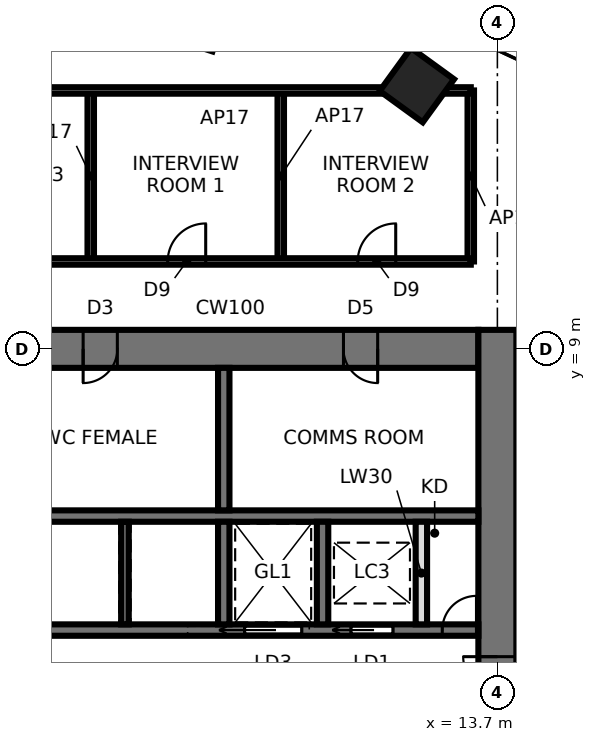
"""IFC4 building model, lengths in metres.
Left out: names, types, materials, properties, quantities, classifications, styles, units other than length and angle.
Written with IfcOpenShell. Run it as: python <this file> out.ifc"""

import sys

from ifc_helpers import new_model, si_unit, direction, frame, frame_2d, origin, origin_2d, place, context, subcontext, project, spatial, rectangle, extrude, element, fill, save


model = new_model("IFC4")
c1 = context("Model", 3, precision=1e-05, world=origin(), true_north=direction((0.0, 1.0)))
c2 = subcontext(c1, "Body", "Model", "MODEL_VIEW")
j1 = project(units=[si_unit("LENGTHUNIT", "METRE"), si_unit("PLANEANGLEUNIT", "RADIAN")], contexts=[c1])
p1 = place(None, origin())
s1 = spatial("IfcSite", under=j1, at=p1, CompositionType="ELEMENT")
p2 = place(p1, origin())
s2 = spatial("IfcBuilding", under=s1, at=p2, CompositionType="ELEMENT")
p3 = place(p2, frame((0.0, 0.0, 234.5)))
s3 = spatial("IfcBuildingStorey", under=s2, at=p3, CompositionType="ELEMENT", Elevation=234.5)
p4 = place(p3, frame((11.581, 15.94, 0.0), z_axis=(0.0, 0.0, 1.0), x_axis=(0.587785252292, 0.809016994375, 0.0)))
e1 = element("IfcColumn", 1, at=p4, inside=s3, PredefinedType="COLUMN", context=c2, shape_type="SweptSolid", body=[
    extrude(rectangle(XDim=1.4, YDim=1.4, at=origin_2d()), origin(), (0.0, 0.0, 1.0), 3.9),
])
p5 = place(p3, frame((13.2, 9.0, 0.0), z_axis=(0.0, 0.0, 1.0), x_axis=(-1.0, 0.0, 0.0)))
e2 = element("IfcWall", 2, at=p5, inside=s3, PredefinedType="SHEAR", context=c2, shape_type="SweptSolid", body=[
    extrude(rectangle(XDim=26.4, YDim=1.0, at=frame_2d((13.2, 0.0))), origin(), (0.0, 0.0, 1.0), 3.9),
])
p6 = place(p5, frame((2.65, 0.0, 0.0)))
e3 = element("IfcOpeningElement", 3, at=p6, cuts=e2, PredefinedType="OPENING", context=c2, shape_type="SweptSolid", body=[
    extrude(rectangle(XDim=0.9, YDim=2.1, at=frame_2d((0.45, 1.05))), frame((0.0, 0.51, 0.0), z_axis=(0.0, -1.0, 0.0), x_axis=(1.0, 0.0, 0.0)), (0.0, 0.0, 1.0), 1.02),
])
p7 = place(p5, frame((9.5, 0.0, 0.0)))
e4 = element("IfcOpeningElement", 4, at=p7, cuts=e2, PredefinedType="OPENING", context=c2, shape_type="SweptSolid", body=[
    extrude(rectangle(XDim=0.9, YDim=2.1, at=frame_2d((0.45, 1.05))), frame((0.0, 0.51, 0.0), z_axis=(0.0, -1.0, 0.0), x_axis=(1.0, 0.0, 0.0)), (0.0, 0.0, 1.0), 1.02),
])
p8 = place(p5, frame((16.0, 0.0, 0.0)))
e5 = element("IfcOpeningElement", 5, at=p8, cuts=e2, PredefinedType="OPENING", context=c2, shape_type="SweptSolid", body=[
    extrude(rectangle(XDim=0.9, YDim=2.1, at=frame_2d((0.45, 1.05))), frame((0.0, 0.51, 0.0), z_axis=(0.0, -1.0, 0.0), x_axis=(1.0, 0.0, 0.0)), (0.0, 0.0, 1.0), 1.02),
])
p9 = place(p5, frame((21.25, 0.0, 0.0)))
e6 = element("IfcOpeningElement", 6, at=p9, cuts=e2, PredefinedType="OPENING", context=c2, shape_type="SweptSolid", body=[
    extrude(rectangle(XDim=0.9, YDim=2.1, at=frame_2d((0.45, 1.05))), frame((0.0, 0.51, 0.0), z_axis=(0.0, -1.0, 0.0), x_axis=(1.0, 0.0, 0.0)), (0.0, 0.0, 1.0), 1.02),
])
p10 = place(p5, frame((24.8, 0.0, 0.0)))
e7 = element("IfcOpeningElement", 7, at=p10, cuts=e2, PredefinedType="OPENING", context=c2, shape_type="SweptSolid", body=[
    extrude(rectangle(XDim=1.0, YDim=2.1, at=frame_2d((0.5, 1.05))), frame((0.0, 0.51, 0.0), z_axis=(0.0, -1.0, 0.0), x_axis=(1.0, 0.0, 0.0)), (0.0, 0.0, 1.0), 1.02),
])
p11 = place(p3, frame((13.7, -9.5, 0.0), z_axis=(0.0, 0.0, 1.0), x_axis=(0.0, 1.0, 0.0)))
e8 = element("IfcWall", 8, at=p11, inside=s3, PredefinedType="SHEAR", context=c2, shape_type="SweptSolid", body=[
    extrude(rectangle(XDim=19.0, YDim=1.0, at=frame_2d((9.5, 0.0))), origin(), (0.0, 0.0, 1.0), 3.9),
])
p12 = place(p11, frame((8.6, 0.0, 0.0)))
e9 = element("IfcOpeningElement", 9, at=p12, cuts=e8, PredefinedType="OPENING", context=c2, shape_type="SweptSolid", body=[
    extrude(rectangle(XDim=1.8, YDim=2.4, at=frame_2d((0.9, 1.2))), frame((0.0, 0.51, 0.0), z_axis=(0.0, -1.0, 0.0), x_axis=(1.0, 0.0, 0.0)), (0.0, 0.0, 1.0), 1.02),
])
p13 = place(p3, frame((-13.2, 1.6, 0.0), z_axis=(0.0, 0.0, 1.0), x_axis=(1.0, 0.0, 0.0)))
e10 = element("IfcWall", 10, at=p13, inside=s3, PredefinedType="SHEAR", context=c2, shape_type="SweptSolid", body=[
    extrude(rectangle(XDim=26.4, YDim=0.3, at=frame_2d((13.2, 0.0))), origin(), (0.0, 0.0, 1.0), 3.9),
])
p14 = place(p13, frame((0.25, 0.0, 0.0)))
e11 = element("IfcOpeningElement", 11, at=p14, cuts=e10, PredefinedType="OPENING", context=c2, shape_type="SweptSolid", body=[
    extrude(rectangle(XDim=1.0, YDim=2.1, at=frame_2d((0.5, 1.05))), frame((0.0, 0.16, 0.0), z_axis=(0.0, -1.0, 0.0), x_axis=(1.0, 0.0, 0.0)), (0.0, 0.0, 1.0), 0.32),
])
p15 = place(p13, frame((23.05, 0.0, 0.0)))
e12 = element("IfcOpeningElement", 12, at=p15, cuts=e10, PredefinedType="OPENING", context=c2, shape_type="SweptSolid", body=[
    extrude(rectangle(XDim=1.1, YDim=2.3, at=frame_2d((0.55, 1.15))), frame((0.0, 0.16, 0.0), z_axis=(0.0, -1.0, 0.0), x_axis=(1.0, 0.0, 0.0)), (0.0, 0.0, 1.0), 0.32),
])
p16 = place(p13, frame((20.25, 0.0, 0.0)))
e13 = element("IfcOpeningElement", 13, at=p16, cuts=e10, PredefinedType="OPENING", context=c2, shape_type="SweptSolid", body=[
    extrude(rectangle(XDim=1.5, YDim=2.4, at=frame_2d((0.75, 1.2))), frame((0.0, 0.16, 0.0), z_axis=(0.0, -1.0, 0.0), x_axis=(1.0, 0.0, 0.0)), (0.0, 0.0, 1.0), 0.32),
])
p17 = place(p13, frame((7.55, 0.0, 0.0)))
e14 = element("IfcOpeningElement", 14, at=p17, cuts=e10, PredefinedType="OPENING", context=c2, shape_type="SweptSolid", body=[
    extrude(rectangle(XDim=0.9, YDim=2.1, at=frame_2d((0.45, 1.05))), frame((0.0, 0.16, 0.0), z_axis=(0.0, -1.0, 0.0), x_axis=(1.0, 0.0, 0.0)), (0.0, 0.0, 1.0), 0.32),
])
p18 = place(p13, frame((10.15, 0.0, 0.0)))
e15 = element("IfcOpeningElement", 15, at=p18, cuts=e10, PredefinedType="OPENING", context=c2, shape_type="SweptSolid", body=[
    extrude(rectangle(XDim=0.9, YDim=2.1, at=frame_2d((0.45, 1.05))), frame((0.0, 0.16, 0.0), z_axis=(0.0, -1.0, 0.0), x_axis=(1.0, 0.0, 0.0)), (0.0, 0.0, 1.0), 0.32),
])
p19 = place(p13, frame((12.75, 0.0, 0.0)))
e16 = element("IfcOpeningElement", 16, at=p19, cuts=e10, PredefinedType="OPENING", context=c2, shape_type="SweptSolid", body=[
    extrude(rectangle(XDim=0.9, YDim=2.1, at=frame_2d((0.45, 1.05))), frame((0.0, 0.16, 0.0), z_axis=(0.0, -1.0, 0.0), x_axis=(1.0, 0.0, 0.0)), (0.0, 0.0, 1.0), 0.32),
])
p20 = place(p13, frame((25.45, 0.0, 0.0)))
e17 = element("IfcOpeningElement", 17, at=p20, cuts=e10, PredefinedType="OPENING", context=c2, shape_type="SweptSolid", body=[
    extrude(rectangle(XDim=0.9, YDim=2.1, at=frame_2d((0.45, 1.05))), frame((0.0, 0.16, 0.0), z_axis=(0.0, -1.0, 0.0), x_axis=(1.0, 0.0, 0.0)), (0.0, 0.0, 1.0), 0.32),
])
p21 = place(p3, frame((-13.2, 4.6, 0.0), z_axis=(0.0, 0.0, 1.0), x_axis=(1.0, 0.0, 0.0)))
e18 = element("IfcWall", 18, at=p21, inside=s3, PredefinedType="SHEAR", context=c2, shape_type="SweptSolid", body=[
    extrude(rectangle(XDim=26.4, YDim=0.3, at=frame_2d((13.2, 0.0))), origin(), (0.0, 0.0, 1.0), 3.9),
])
p22 = place(p3, frame((6.5, 1.75, 0.0), z_axis=(0.0, 0.0, 1.0), x_axis=(0.0, 1.0, 0.0)))
e19 = element("IfcWall", 19, at=p22, inside=s3, PredefinedType="SHEAR", context=c2, shape_type="SweptSolid", body=[
    extrude(rectangle(XDim=2.7, YDim=0.3, at=frame_2d((1.35, 0.0))), origin(), (0.0, 0.0, 1.0), 3.9),
])
p23 = place(p3, frame((6.5, 4.75, 0.0), z_axis=(0.0, 0.0, 1.0), x_axis=(0.0, 1.0, 0.0)))
e20 = element("IfcWall", 20, at=p23, inside=s3, PredefinedType="SHEAR", context=c2, shape_type="SweptSolid", body=[
    extrude(rectangle(XDim=3.75, YDim=0.3, at=frame_2d((1.875, 0.0))), origin(), (0.0, 0.0, 1.0), 3.9),
])
p24 = place(p3, frame((3.9, 1.75, 0.0), z_axis=(0.0, 0.0, 1.0), x_axis=(0.0, 1.0, 0.0)))
e21 = element("IfcWall", 21, at=p24, inside=s3, PredefinedType="SHEAR", context=c2, shape_type="SweptSolid", body=[
    extrude(rectangle(XDim=2.7, YDim=0.2, at=frame_2d((1.35, 0.0))), origin(), (0.0, 0.0, 1.0), 3.9),
])
p25 = place(p3, frame((9.1, 1.75, 0.0), z_axis=(0.0, 0.0, 1.0), x_axis=(0.0, 1.0, 0.0)))
e22 = element("IfcWall", 22, at=p25, inside=s3, PredefinedType="SHEAR", context=c2, shape_type="SweptSolid", body=[
    extrude(rectangle(XDim=2.7, YDim=0.3, at=frame_2d((1.35, 0.0))), origin(), (0.0, 0.0, 1.0), 3.9),
])
p26 = place(p3, frame((11.7, 1.75, 0.0), z_axis=(0.0, 0.0, 1.0), x_axis=(0.0, 1.0, 0.0)))
e23 = element("IfcWall", 23, at=p26, inside=s3, PredefinedType="SOLIDWALL", context=c2, shape_type="SweptSolid", body=[
    extrude(rectangle(XDim=2.7, YDim=0.3, at=frame_2d((1.35, 0.0))), origin(), (0.0, 0.0, 1.0), 3.74),
])
for number, where, z_axis, x_axis in (
    (24, (13.0, 11.3, 0.0), (0.0, 0.0, 1.0), (0.0, 1.0, 0.0)),
    (25, (8.0, 15.8, 0.0), (0.0, 0.0, 1.0), (0.0, -1.0, 0.0)),
    (26, (3.0, 15.8, 0.0), (0.0, 0.0, 1.0), (0.0, -1.0, 0.0)),
):
    element("IfcWall", number, at=place(p3, frame(where, z_axis=z_axis, x_axis=x_axis)), inside=s3, PredefinedType="PARTITIONING", context=c2, shape_type="SweptSolid", body=[
        extrude(rectangle(XDim=4.5, YDim=0.17, at=frame_2d((2.25, 0.0))), origin(), (0.0, 0.0, 1.0), 3.74),
    ])
p27 = place(p3, frame((1.661, 15.8, 0.0), z_axis=(0.0, 0.0, 1.0), x_axis=(0.104548874513, 0.994519749848, 0.0)))
e27 = element("IfcWall", 27, at=p27, inside=s3, PredefinedType="PARTITIONING", context=c2, shape_type="SweptSolid", body=[
    extrude(rectangle(XDim=4.302, YDim=0.12, at=frame_2d((2.151, 0.0))), origin(), (0.0, 0.0, 1.0), 3.74),
])
p28 = place(p3, frame((-13.0, 11.3, 0.0), z_axis=(0.0, 0.0, 1.0), x_axis=(1.0, 0.0, 0.0)))
e28 = element("IfcWall", 28, at=p28, inside=s3, PredefinedType="PARTITIONING", context=c2, shape_type="SweptSolid", body=[
    extrude(rectangle(XDim=26.0, YDim=0.17, at=frame_2d((13.0, 0.0))), origin(), (0.0, 0.0, 1.0), 3.74),
])
p29 = place(p28, frame((1.95, 0.0, 0.0)))
e29 = element("IfcOpeningElement", 29, at=p29, cuts=e28, PredefinedType="OPENING", context=c2, shape_type="SweptSolid", body=[
    extrude(rectangle(XDim=1.1, YDim=2.4, at=frame_2d((0.55, 1.2))), frame((0.0, 0.095, 0.0), z_axis=(0.0, -1.0, 0.0), x_axis=(1.0, 0.0, 0.0)), (0.0, 0.0, 1.0), 0.19),
])
p30 = place(p28, frame((6.95, 0.0, 0.0)))
e30 = element("IfcOpeningElement", 30, at=p30, cuts=e28, PredefinedType="OPENING", context=c2, shape_type="SweptSolid", body=[
    extrude(rectangle(XDim=1.1, YDim=2.4, at=frame_2d((0.55, 1.2))), frame((0.0, 0.095, 0.0), z_axis=(0.0, -1.0, 0.0), x_axis=(1.0, 0.0, 0.0)), (0.0, 0.0, 1.0), 0.19),
])
p31 = place(p28, frame((18.025, 0.0, 0.0)))
e31 = element("IfcOpeningElement", 31, at=p31, cuts=e28, PredefinedType="OPENING", context=c2, shape_type="SweptSolid", body=[
    extrude(rectangle(XDim=1.0, YDim=2.4, at=frame_2d((0.5, 1.2))), frame((0.0, 0.095, 0.0), z_axis=(0.0, -1.0, 0.0), x_axis=(1.0, 0.0, 0.0)), (0.0, 0.0, 1.0), 0.19),
])
p32 = place(p28, frame((23.025, 0.0, 0.0)))
e32 = element("IfcOpeningElement", 32, at=p32, cuts=e28, PredefinedType="OPENING", context=c2, shape_type="SweptSolid", body=[
    extrude(rectangle(XDim=1.0, YDim=2.4, at=frame_2d((0.5, 1.2))), frame((0.0, 0.095, 0.0), z_axis=(0.0, -1.0, 0.0), x_axis=(1.0, 0.0, 0.0)), (0.0, 0.0, 1.0), 0.19),
])
p33 = place(p3, frame((13.0, 15.8, 0.0), z_axis=(0.0, 0.0, 1.0), x_axis=(-1.0, 0.0, 0.0)))
e33 = element("IfcWall", 33, at=p33, inside=s3, PredefinedType="PARTITIONING", context=c2, shape_type="SweptSolid", body=[
    extrude(rectangle(XDim=26.0, YDim=0.17, at=frame_2d((13.0, 0.0))), origin(), (0.0, 0.0, 1.0), 3.74),
])
p34 = place(p33, frame((13.095, 0.0, 0.0)))
e34 = element("IfcOpeningElement", 34, at=p34, cuts=e33, PredefinedType="OPENING", context=c2, shape_type="SweptSolid", body=[
    extrude(rectangle(XDim=1.1, YDim=2.4, at=frame_2d((0.55, 1.2))), frame((0.0, 0.095, 0.0), z_axis=(0.0, -1.0, 0.0), x_axis=(1.0, 0.0, 0.0)), (0.0, 0.0, 1.0), 0.19),
])
p35 = place(p12, origin())
e35 = element("IfcDoor", 35, at=p35, inside=s3, OperationType="DOUBLE_DOOR_SINGLE_SWING", PredefinedType="DOOR", context=c2, shape_type="SweptSolid", body=[
    extrude(rectangle(XDim=1.72, YDim=2.36, at=frame_2d((0.9, 1.18))), frame((0.0, 0.025, 0.0), z_axis=(0.0, -1.0, 0.0), x_axis=(1.0, 0.0, 0.0)), (0.0, 0.0, 1.0), 0.05),
    extrude(rectangle(XDim=0.04, YDim=2.4, at=frame_2d((0.02, 1.2))), frame((0.0, 0.25, 0.0), z_axis=(0.0, -1.0, 0.0), x_axis=(1.0, 0.0, 0.0)), (0.0, 0.0, 1.0), 0.5),
    extrude(rectangle(XDim=0.04, YDim=2.4, at=frame_2d((1.78, 1.2))), frame((0.0, 0.25, 0.0), z_axis=(0.0, -1.0, 0.0), x_axis=(1.0, 0.0, 0.0)), (0.0, 0.0, 1.0), 0.5),
    extrude(rectangle(XDim=1.72, YDim=0.04, at=frame_2d((0.9, 2.38))), frame((0.0, 0.25, 0.0), z_axis=(0.0, -1.0, 0.0), x_axis=(1.0, 0.0, 0.0)), (0.0, 0.0, 1.0), 0.5),
])
fill(e9, e35)
p36 = place(p15, origin())
e36 = element("IfcDoor", 36, at=p36, inside=s3, OperationType="SLIDING_TO_LEFT", PredefinedType="DOOR", context=c2, shape_type="SweptSolid", body=[
    extrude(rectangle(XDim=1.1, YDim=2.3, at=frame_2d((0.55, 1.15))), frame((0.0, 0.025, 0.0), z_axis=(0.0, -1.0, 0.0), x_axis=(1.0, 0.0, 0.0)), (0.0, 0.0, 1.0), 0.05),
])
fill(e12, e36)
p37 = place(p16, origin())
e37 = element("IfcDoor", 37, at=p37, inside=s3, OperationType="SLIDING_TO_LEFT", PredefinedType="DOOR", context=c2, shape_type="SweptSolid", body=[
    extrude(rectangle(XDim=1.5, YDim=2.4, at=frame_2d((0.75, 1.2))), frame((0.0, 0.025, 0.0), z_axis=(0.0, -1.0, 0.0), x_axis=(1.0, 0.0, 0.0)), (0.0, 0.0, 1.0), 0.05),
])
fill(e13, e37)
p38 = place(p20, origin())
e38 = element("IfcDoor", 38, at=p38, inside=s3, OperationType="SINGLE_SWING_RIGHT", PredefinedType="DOOR", context=c2, shape_type="SweptSolid", body=[
    extrude(rectangle(XDim=0.9, YDim=2.1, at=frame_2d((0.45, 1.05))), frame((0.0, 0.025, 0.0), z_axis=(0.0, -1.0, 0.0), x_axis=(1.0, 0.0, 0.0)), (0.0, 0.0, 1.0), 0.05),
])
fill(e17, e38)
p39 = place(p6, origin())
e39 = element("IfcDoor", 39, at=p39, inside=s3, OperationType="SINGLE_SWING_LEFT", PredefinedType="DOOR", context=c2, shape_type="SweptSolid", body=[
    extrude(rectangle(XDim=0.82, YDim=2.06, at=frame_2d((0.45, 1.03))), frame((0.0, 0.025, 0.0), z_axis=(0.0, -1.0, 0.0), x_axis=(1.0, 0.0, 0.0)), (0.0, 0.0, 1.0), 0.05),
    extrude(rectangle(XDim=0.04, YDim=2.1, at=frame_2d((0.02, 1.05))), frame((0.0, 0.25, 0.0), z_axis=(0.0, -1.0, 0.0), x_axis=(1.0, 0.0, 0.0)), (0.0, 0.0, 1.0), 0.5),
    extrude(rectangle(XDim=0.04, YDim=2.1, at=frame_2d((0.88, 1.05))), frame((0.0, 0.25, 0.0), z_axis=(0.0, -1.0, 0.0), x_axis=(1.0, 0.0, 0.0)), (0.0, 0.0, 1.0), 0.5),
    extrude(rectangle(XDim=0.82, YDim=0.04, at=frame_2d((0.45, 2.08))), frame((0.0, 0.25, 0.0), z_axis=(0.0, -1.0, 0.0), x_axis=(1.0, 0.0, 0.0)), (0.0, 0.0, 1.0), 0.5),
])
fill(e3, e39)
p40 = place(p7, origin())
e40 = element("IfcDoor", 40, at=p40, inside=s3, OperationType="SINGLE_SWING_RIGHT", PredefinedType="DOOR", context=c2, shape_type="SweptSolid", body=[
    extrude(rectangle(XDim=0.82, YDim=2.06, at=frame_2d((0.45, 1.03))), frame((0.0, 0.025, 0.0), z_axis=(0.0, -1.0, 0.0), x_axis=(1.0, 0.0, 0.0)), (0.0, 0.0, 1.0), 0.05),
    extrude(rectangle(XDim=0.04, YDim=2.1, at=frame_2d((0.02, 1.05))), frame((0.0, 0.25, 0.0), z_axis=(0.0, -1.0, 0.0), x_axis=(1.0, 0.0, 0.0)), (0.0, 0.0, 1.0), 0.5),
    extrude(rectangle(XDim=0.04, YDim=2.1, at=frame_2d((0.88, 1.05))), frame((0.0, 0.25, 0.0), z_axis=(0.0, -1.0, 0.0), x_axis=(1.0, 0.0, 0.0)), (0.0, 0.0, 1.0), 0.5),
    extrude(rectangle(XDim=0.82, YDim=0.04, at=frame_2d((0.45, 2.08))), frame((0.0, 0.25, 0.0), z_axis=(0.0, -1.0, 0.0), x_axis=(1.0, 0.0, 0.0)), (0.0, 0.0, 1.0), 0.5),
])
fill(e4, e40)
p41 = place(p31, origin())
e41 = element("IfcDoor", 41, at=p41, inside=s3, OperationType="SINGLE_SWING_RIGHT", PredefinedType="DOOR", context=c2, shape_type="SweptSolid", body=[
    extrude(rectangle(XDim=1.0, YDim=2.4, at=frame_2d((0.5, 1.2))), frame((0.0, 0.025, 0.0), z_axis=(0.0, -1.0, 0.0), x_axis=(1.0, 0.0, 0.0)), (0.0, 0.0, 1.0), 0.05),
])
fill(e31, e41)
p42 = place(p32, origin())
e42 = element("IfcDoor", 42, at=p42, inside=s3, OperationType="SINGLE_SWING_RIGHT", PredefinedType="DOOR", context=c2, shape_type="SweptSolid", body=[
    extrude(rectangle(XDim=1.0, YDim=2.4, at=frame_2d((0.5, 1.2))), frame((0.0, 0.025, 0.0), z_axis=(0.0, -1.0, 0.0), x_axis=(1.0, 0.0, 0.0)), (0.0, 0.0, 1.0), 0.05),
])
fill(e32, e42)
save(model, sys.argv[1])
